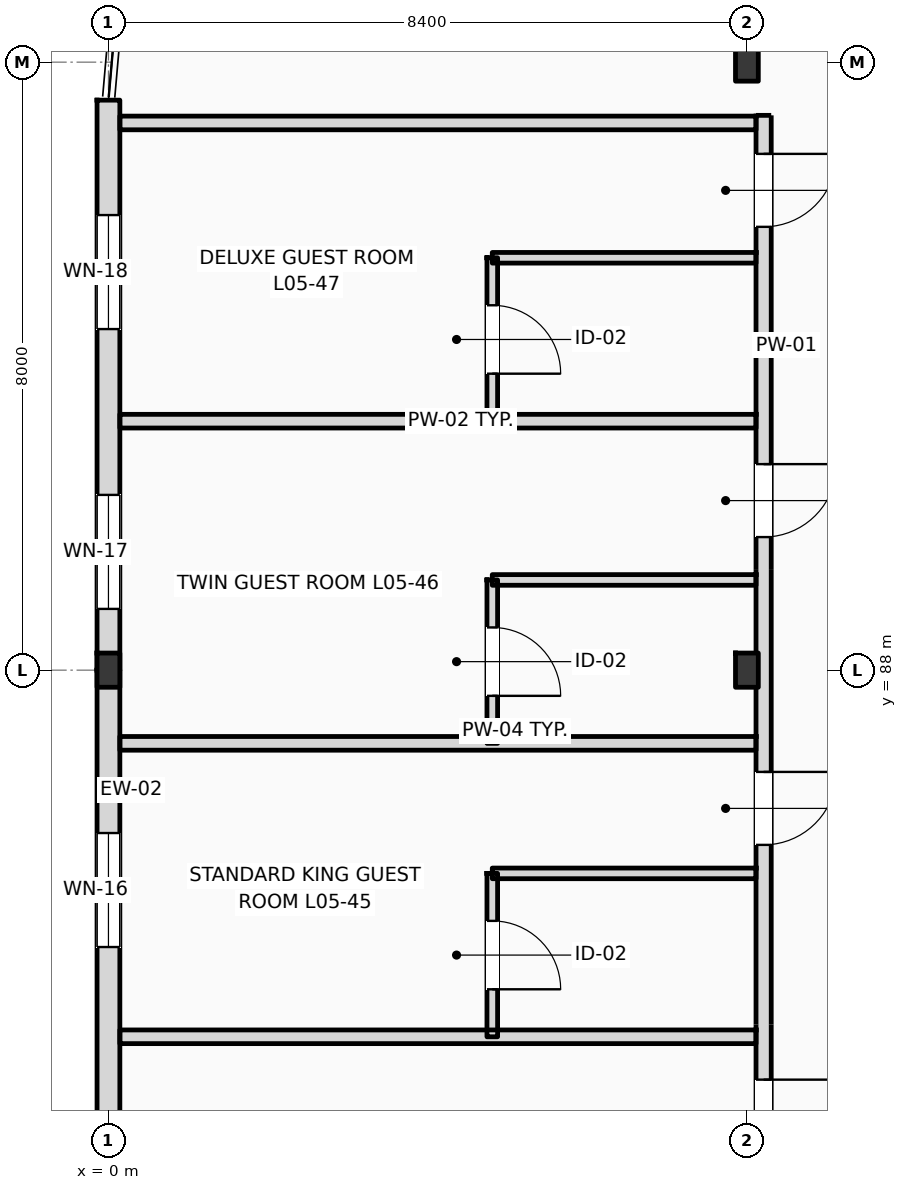
"""IFC4 building model, lengths in metres.
Left out: names, types, materials, properties, quantities, classifications, styles, units other than length and angle.
Written with IfcOpenShell. Run it as: python <this file> out.ifc"""

import sys

from ifc_helpers import new_model, si_unit, direction, frame, frame_2d, origin, origin_2d, place, context, subcontext, project, spatial, rectangle, i_section, extrude, element, fill, save


model = new_model("IFC4")
c1 = context("Model", 3, precision=1e-05, world=origin(), true_north=direction((0.0, 1.0)))
c2 = subcontext(c1, "Body", "Model", "MODEL_VIEW")
j1 = project(units=[si_unit("LENGTHUNIT", "METRE"), si_unit("PLANEANGLEUNIT", "RADIAN")], contexts=[c1])
p1 = place(None, origin())
s1 = spatial("IfcSite", under=j1, at=p1, CompositionType="ELEMENT")
p2 = place(p1, origin())
s2 = spatial("IfcBuilding", under=s1, at=p2, CompositionType="ELEMENT")
p3 = place(p2, frame((0.0, 0.0, 24.6)))
s3 = spatial("IfcBuildingStorey", under=s2, at=p3, CompositionType="ELEMENT", Elevation=24.6)
for number, where, z_axis, x_axis in (
    (1, (0.0, 88.0, 0.0), (0.0, 0.0, 1.0), (1.0, 0.0, 0.0)),
    (2, (8.4, 88.0, 0.0), (0.0, 0.0, 1.0), (1.0, 0.0, 0.0)),
):
    element("IfcColumn", number, at=place(p3, frame(where, z_axis=z_axis, x_axis=x_axis)), inside=s3, PredefinedType="COLUMN", context=c2, shape_type="SweptSolid", body=[
        extrude(i_section(OverallWidth=0.3, OverallDepth=0.45, WebThickness=0.014, FlangeThickness=0.026, FilletRadius=0.027, at=origin_2d()), origin(), (0.0, 0.0, 1.0), 3.6),
    ])
p4 = place(p3, frame((8.4, 96.0, 0.0), z_axis=(0.0, 0.0, 1.0), x_axis=(1.0, 0.0, 0.0)))
e3 = element("IfcColumn", 3, at=p4, inside=s3, PredefinedType="COLUMN", context=c2, shape_type="SweptSolid", body=[
    extrude(i_section(OverallWidth=0.3, OverallDepth=0.5, WebThickness=0.014, FlangeThickness=0.028, FilletRadius=0.027, at=origin_2d()), origin(), (0.0, 0.0, 1.0), 3.6),
])
p5 = place(p3, frame((0.0, 79.5, 0.0), z_axis=(0.0, 0.0, 1.0), x_axis=(0.0, 1.0, 0.0)))
e4 = element("IfcWall", 4, at=p5, inside=s3, PredefinedType="STANDARD", context=c2, shape_type="SweptSolid", body=[
    extrude(rectangle(XDim=8.5, YDim=0.3, at=frame_2d((4.25, 0.0))), origin(), (0.0, 0.0, 1.0), 2.93),
])
p6 = place(p5, frame((0.806, 0.0, 0.9)))
e5 = element("IfcOpeningElement", 5, at=p6, cuts=e4, PredefinedType="OPENING", context=c2, shape_type="SweptSolid", body=[
    extrude(rectangle(XDim=1.5, YDim=1.85, at=frame_2d((0.75, 0.925))), frame((0.0, 0.16, 0.0), z_axis=(0.0, -1.0, 0.0), x_axis=(1.0, 0.0, 0.0)), (0.0, 0.0, 1.0), 0.32),
])
p7 = place(p5, frame((4.857, 0.0, 0.9)))
e6 = element("IfcOpeningElement", 6, at=p7, cuts=e4, PredefinedType="OPENING", context=c2, shape_type="SweptSolid", body=[
    extrude(rectangle(XDim=1.5, YDim=1.85, at=frame_2d((0.75, 0.925))), frame((0.0, 0.16, 0.0), z_axis=(0.0, -1.0, 0.0), x_axis=(1.0, 0.0, 0.0)), (0.0, 0.0, 1.0), 0.32),
])
p8 = place(p3, frame((0.0, 88.0, 0.0), z_axis=(0.0, 0.0, 1.0), x_axis=(0.0, 1.0, 0.0)))
e7 = element("IfcWall", 7, at=p8, inside=s3, PredefinedType="STANDARD", context=c2, shape_type="SweptSolid", body=[
    extrude(rectangle(XDim=7.5, YDim=0.3, at=frame_2d((3.75, 0.0))), origin(), (0.0, 0.0, 1.0), 3.34),
])
p9 = place(p8, frame((0.806, 0.0, 0.9)))
e8 = element("IfcOpeningElement", 8, at=p9, cuts=e7, PredefinedType="OPENING", context=c2, shape_type="SweptSolid", body=[
    extrude(rectangle(XDim=1.5, YDim=2.26, at=frame_2d((0.75, 1.13))), frame((0.0, 0.16, 0.0), z_axis=(0.0, -1.0, 0.0), x_axis=(1.0, 0.0, 0.0)), (0.0, 0.0, 1.0), 0.32),
])
p10 = place(p8, frame((4.488, 0.0, 0.9)))
e9 = element("IfcOpeningElement", 9, at=p10, cuts=e7, PredefinedType="OPENING", context=c2, shape_type="SweptSolid", body=[
    extrude(rectangle(XDim=1.5, YDim=2.26, at=frame_2d((0.75, 1.13))), frame((0.0, 0.16, 0.0), z_axis=(0.0, -1.0, 0.0), x_axis=(1.0, 0.0, 0.0)), (0.0, 0.0, 1.0), 0.32),
])
p11 = place(p3, frame((8.62, 62.64, 0.0), z_axis=(0.0, 0.0, 1.0), x_axis=(0.0, 1.0, 0.0)))
e10 = element("IfcWall", 10, at=p11, inside=s3, PredefinedType="PARTITIONING", context=c2, shape_type="SweptSolid", body=[
    extrude(rectangle(XDim=32.66, YDim=0.2, at=frame_2d((16.33, 0.0))), origin(), (0.0, 0.0, 1.0), 2.93),
])
p12 = place(p11, frame((2.843, 0.0, 0.0)))
e11 = element("IfcOpeningElement", 11, at=p12, cuts=e10, PredefinedType="OPENING", context=c2, shape_type="SweptSolid", body=[
    extrude(rectangle(XDim=0.96, YDim=2.2, at=frame_2d((0.48, 1.1))), frame((0.0, 0.11, 0.0), z_axis=(0.0, -1.0, 0.0), x_axis=(1.0, 0.0, 0.0)), (0.0, 0.0, 1.0), 0.22),
])
p13 = place(p11, frame((4.711, 0.0, 0.0)))
e12 = element("IfcOpeningElement", 12, at=p13, cuts=e10, PredefinedType="OPENING", context=c2, shape_type="SweptSolid", body=[
    extrude(rectangle(XDim=0.96, YDim=2.2, at=frame_2d((0.48, 1.1))), frame((0.0, 0.11, 0.0), z_axis=(0.0, -1.0, 0.0), x_axis=(1.0, 0.0, 0.0)), (0.0, 0.0, 1.0), 0.22),
])
p14 = place(p11, frame((10.911, 0.0, 0.0)))
e13 = element("IfcOpeningElement", 13, at=p14, cuts=e10, PredefinedType="OPENING", context=c2, shape_type="SweptSolid", body=[
    extrude(rectangle(XDim=0.96, YDim=2.2, at=frame_2d((0.48, 1.1))), frame((0.0, 0.11, 0.0), z_axis=(0.0, -1.0, 0.0), x_axis=(1.0, 0.0, 0.0)), (0.0, 0.0, 1.0), 0.22),
])
p15 = place(p11, frame((14.961, 0.0, 0.0)))
e14 = element("IfcOpeningElement", 14, at=p15, cuts=e10, PredefinedType="OPENING", context=c2, shape_type="SweptSolid", body=[
    extrude(rectangle(XDim=0.96, YDim=2.2, at=frame_2d((0.48, 1.1))), frame((0.0, 0.11, 0.0), z_axis=(0.0, -1.0, 0.0), x_axis=(1.0, 0.0, 0.0)), (0.0, 0.0, 1.0), 0.22),
])
p16 = place(p11, frame((19.012, 0.0, 0.0)))
e15 = element("IfcOpeningElement", 15, at=p16, cuts=e10, PredefinedType="OPENING", context=c2, shape_type="SweptSolid", body=[
    extrude(rectangle(XDim=0.96, YDim=2.2, at=frame_2d((0.48, 1.1))), frame((0.0, 0.11, 0.0), z_axis=(0.0, -1.0, 0.0), x_axis=(1.0, 0.0, 0.0)), (0.0, 0.0, 1.0), 0.22),
])
p17 = place(p11, frame((23.061, 0.0, 0.0)))
e16 = element("IfcOpeningElement", 16, at=p17, cuts=e10, PredefinedType="OPENING", context=c2, shape_type="SweptSolid", body=[
    extrude(rectangle(XDim=0.96, YDim=2.2, at=frame_2d((0.48, 1.1))), frame((0.0, 0.11, 0.0), z_axis=(0.0, -1.0, 0.0), x_axis=(1.0, 0.0, 0.0)), (0.0, 0.0, 1.0), 0.22),
])
p18 = place(p11, frame((27.111, 0.0, 0.0)))
e17 = element("IfcOpeningElement", 17, at=p18, cuts=e10, PredefinedType="OPENING", context=c2, shape_type="SweptSolid", body=[
    extrude(rectangle(XDim=0.96, YDim=2.2, at=frame_2d((0.48, 1.1))), frame((0.0, 0.11, 0.0), z_axis=(0.0, -1.0, 0.0), x_axis=(1.0, 0.0, 0.0)), (0.0, 0.0, 1.0), 0.22),
])
p19 = place(p11, frame((31.193, 0.0, 0.0)))
e18 = element("IfcOpeningElement", 18, at=p19, cuts=e10, PredefinedType="OPENING", context=c2, shape_type="SweptSolid", body=[
    extrude(rectangle(XDim=0.96, YDim=2.2, at=frame_2d((0.48, 1.1))), frame((0.0, 0.11, 0.0), z_axis=(0.0, -1.0, 0.0), x_axis=(1.0, 0.0, 0.0)), (0.0, 0.0, 1.0), 0.22),
])
for number, where, z_axis, x_axis in (
    (19, (0.15, 83.176, 0.0), (0.0, 0.0, 1.0), (1.0, 0.0, 0.0)),
    (20, (0.15, 87.037, 0.0), (0.0, 0.0, 1.0), (1.0, 0.0, 0.0)),
):
    element("IfcWall", number, at=place(p3, frame(where, z_axis=z_axis, x_axis=x_axis)), inside=s3, PredefinedType="PARTITIONING", context=c2, shape_type="SweptSolid", body=[
        extrude(rectangle(XDim=8.37, YDim=0.18, at=frame_2d((4.185, 0.0))), origin(), (0.0, 0.0, 1.0), 3.34),
    ])
p20 = place(p3, frame((5.05, 85.326, 0.0), z_axis=(0.0, 0.0, 1.0), x_axis=(1.0, 0.0, 0.0)))
e21 = element("IfcWall", 21, at=p20, inside=s3, PredefinedType="PARTITIONING", context=c2, shape_type="SweptSolid", body=[
    extrude(rectangle(XDim=3.47, YDim=0.14, at=frame_2d((1.735, 0.0))), origin(), (0.0, 0.0, 1.0), 3.34),
])
p21 = place(p3, frame((5.05, 83.176, 0.0), z_axis=(0.0, 0.0, 1.0), x_axis=(0.0, 1.0, 0.0)))
e22 = element("IfcWall", 22, at=p21, inside=s3, PredefinedType="PARTITIONING", context=c2, shape_type="SweptSolid", body=[
    extrude(rectangle(XDim=2.15, YDim=0.14, at=frame_2d((1.075, 0.0))), origin(), (0.0, 0.0, 1.0), 3.34),
])
p22 = place(p21, frame((0.625, 0.0, 0.0)))
e23 = element("IfcOpeningElement", 23, at=p22, cuts=e22, PredefinedType="OPENING", context=c2, shape_type="SweptSolid", body=[
    extrude(rectangle(XDim=0.9, YDim=2.1, at=frame_2d((0.45, 1.05))), frame((0.0, 0.08, 0.0), z_axis=(0.0, -1.0, 0.0), x_axis=(1.0, 0.0, 0.0)), (0.0, 0.0, 1.0), 0.16),
])
p23 = place(p3, frame((0.15, 91.276, 0.0), z_axis=(0.0, 0.0, 1.0), x_axis=(1.0, 0.0, 0.0)))
e24 = element("IfcWall", 24, at=p23, inside=s3, PredefinedType="PARTITIONING", context=c2, shape_type="SweptSolid", body=[
    extrude(rectangle(XDim=8.37, YDim=0.18, at=frame_2d((4.185, 0.0))), origin(), (0.0, 0.0, 1.0), 3.34),
])
p24 = place(p3, frame((5.05, 89.187, 0.0), z_axis=(0.0, 0.0, 1.0), x_axis=(1.0, 0.0, 0.0)))
e25 = element("IfcWall", 25, at=p24, inside=s3, PredefinedType="PARTITIONING", context=c2, shape_type="SweptSolid", body=[
    extrude(rectangle(XDim=3.47, YDim=0.14, at=frame_2d((1.735, 0.0))), origin(), (0.0, 0.0, 1.0), 3.34),
])
p25 = place(p3, frame((5.05, 87.037, 0.0), z_axis=(0.0, 0.0, 1.0), x_axis=(0.0, 1.0, 0.0)))
e26 = element("IfcWall", 26, at=p25, inside=s3, PredefinedType="PARTITIONING", context=c2, shape_type="SweptSolid", body=[
    extrude(rectangle(XDim=2.15, YDim=0.14, at=frame_2d((1.075, 0.0))), origin(), (0.0, 0.0, 1.0), 3.34),
])
p26 = place(p25, frame((0.625, 0.0, 0.0)))
e27 = element("IfcOpeningElement", 27, at=p26, cuts=e26, PredefinedType="OPENING", context=c2, shape_type="SweptSolid", body=[
    extrude(rectangle(XDim=0.9, YDim=2.1, at=frame_2d((0.45, 1.05))), frame((0.0, 0.08, 0.0), z_axis=(0.0, -1.0, 0.0), x_axis=(1.0, 0.0, 0.0)), (0.0, 0.0, 1.0), 0.16),
])
p27 = place(p3, frame((0.15, 95.2, 0.0), z_axis=(0.0, 0.0, 1.0), x_axis=(1.0, 0.0, 0.0)))
e28 = element("IfcWall", 28, at=p27, inside=s3, PredefinedType="PARTITIONING", context=c2, shape_type="SweptSolid", body=[
    extrude(rectangle(XDim=8.37, YDim=0.18, at=frame_2d((4.185, 0.0))), origin(), (0.0, 0.0, 1.0), 3.34),
])
p28 = place(p3, frame((5.05, 93.426, 0.0), z_axis=(0.0, 0.0, 1.0), x_axis=(1.0, 0.0, 0.0)))
e29 = element("IfcWall", 29, at=p28, inside=s3, PredefinedType="PARTITIONING", context=c2, shape_type="SweptSolid", body=[
    extrude(rectangle(XDim=3.47, YDim=0.14, at=frame_2d((1.735, 0.0))), origin(), (0.0, 0.0, 1.0), 3.34),
])
p29 = place(p3, frame((5.05, 91.276, 0.0), z_axis=(0.0, 0.0, 1.0), x_axis=(0.0, 1.0, 0.0)))
e30 = element("IfcWall", 30, at=p29, inside=s3, PredefinedType="PARTITIONING", context=c2, shape_type="SweptSolid", body=[
    extrude(rectangle(XDim=2.15, YDim=0.14, at=frame_2d((1.075, 0.0))), origin(), (0.0, 0.0, 1.0), 3.34),
])
p30 = place(p29, frame((0.625, 0.0, 0.0)))
e31 = element("IfcOpeningElement", 31, at=p30, cuts=e30, PredefinedType="OPENING", context=c2, shape_type="SweptSolid", body=[
    extrude(rectangle(XDim=0.9, YDim=2.1, at=frame_2d((0.45, 1.05))), frame((0.0, 0.08, 0.0), z_axis=(0.0, -1.0, 0.0), x_axis=(1.0, 0.0, 0.0)), (0.0, 0.0, 1.0), 0.16),
])
p31 = place(p7, origin())
e32 = element("IfcWindow", 32, at=p31, inside=s3, PartitioningType="DOUBLE_PANEL_VERTICAL", PredefinedType="WINDOW", context=c2, shape_type="SweptSolid", body=[
    extrude(rectangle(XDim=1.5, YDim=1.85, at=frame_2d((0.75, 0.925))), frame((0.0, 0.03, 0.0), z_axis=(0.0, -1.0, 0.0), x_axis=(1.0, 0.0, 0.0)), (0.0, 0.0, 1.0), 0.06),
])
fill(e6, e32)
p32 = place(p9, origin())
e33 = element("IfcWindow", 33, at=p32, inside=s3, PartitioningType="DOUBLE_PANEL_VERTICAL", PredefinedType="WINDOW", context=c2, shape_type="SweptSolid", body=[
    extrude(rectangle(XDim=1.5, YDim=2.26, at=frame_2d((0.75, 1.13))), frame((0.0, 0.03, 0.0), z_axis=(0.0, -1.0, 0.0), x_axis=(1.0, 0.0, 0.0)), (0.0, 0.0, 1.0), 0.06),
])
fill(e8, e33)
p33 = place(p10, origin())
e34 = element("IfcWindow", 34, at=p33, inside=s3, PartitioningType="DOUBLE_PANEL_VERTICAL", PredefinedType="WINDOW", context=c2, shape_type="SweptSolid", body=[
    extrude(rectangle(XDim=1.5, YDim=2.26, at=frame_2d((0.75, 1.13))), frame((0.0, 0.03, 0.0), z_axis=(0.0, -1.0, 0.0), x_axis=(1.0, 0.0, 0.0)), (0.0, 0.0, 1.0), 0.06),
])
fill(e9, e34)
p34 = place(p16, frame((0.96, 0.0, 0.0), z_axis=(0.0, 0.0, 1.0), x_axis=(-1.0, 0.0, 0.0)))
e35 = element("IfcDoor", 35, at=p34, inside=s3, OperationType="SINGLE_SWING_RIGHT", PredefinedType="DOOR", context=c2, shape_type="SweptSolid", body=[
    extrude(rectangle(XDim=0.96, YDim=2.2, at=frame_2d((0.48, 1.1))), frame((0.0, 0.025, 0.0), z_axis=(0.0, -1.0, 0.0), x_axis=(1.0, 0.0, 0.0)), (0.0, 0.0, 1.0), 0.05),
])
fill(e15, e35)
p35 = place(p17, frame((0.96, 0.0, 0.0), z_axis=(0.0, 0.0, 1.0), x_axis=(-1.0, 0.0, 0.0)))
e36 = element("IfcDoor", 36, at=p35, inside=s3, OperationType="SINGLE_SWING_RIGHT", PredefinedType="DOOR", context=c2, shape_type="SweptSolid", body=[
    extrude(rectangle(XDim=0.96, YDim=2.2, at=frame_2d((0.48, 1.1))), frame((0.0, 0.025, 0.0), z_axis=(0.0, -1.0, 0.0), x_axis=(1.0, 0.0, 0.0)), (0.0, 0.0, 1.0), 0.05),
])
fill(e16, e36)
p36 = place(p22, frame((0.9, 0.0, 0.0), z_axis=(0.0, 0.0, 1.0), x_axis=(-1.0, 0.0, 0.0)))
e37 = element("IfcDoor", 37, at=p36, inside=s3, OperationType="SINGLE_SWING_LEFT", PredefinedType="DOOR", context=c2, shape_type="SweptSolid", body=[
    extrude(rectangle(XDim=0.9, YDim=2.1, at=frame_2d((0.45, 1.05))), frame((0.0, 0.025, 0.0), z_axis=(0.0, -1.0, 0.0), x_axis=(1.0, 0.0, 0.0)), (0.0, 0.0, 1.0), 0.05),
])
fill(e23, e37)
p37 = place(p18, frame((0.96, 0.0, 0.0), z_axis=(0.0, 0.0, 1.0), x_axis=(-1.0, 0.0, 0.0)))
e38 = element("IfcDoor", 38, at=p37, inside=s3, OperationType="SINGLE_SWING_RIGHT", PredefinedType="DOOR", context=c2, shape_type="SweptSolid", body=[
    extrude(rectangle(XDim=0.96, YDim=2.2, at=frame_2d((0.48, 1.1))), frame((0.0, 0.025, 0.0), z_axis=(0.0, -1.0, 0.0), x_axis=(1.0, 0.0, 0.0)), (0.0, 0.0, 1.0), 0.05),
])
fill(e17, e38)
p38 = place(p26, frame((0.9, 0.0, 0.0), z_axis=(0.0, 0.0, 1.0), x_axis=(-1.0, 0.0, 0.0)))
e39 = element("IfcDoor", 39, at=p38, inside=s3, OperationType="SINGLE_SWING_LEFT", PredefinedType="DOOR", context=c2, shape_type="SweptSolid", body=[
    extrude(rectangle(XDim=0.9, YDim=2.1, at=frame_2d((0.45, 1.05))), frame((0.0, 0.025, 0.0), z_axis=(0.0, -1.0, 0.0), x_axis=(1.0, 0.0, 0.0)), (0.0, 0.0, 1.0), 0.05),
])
fill(e27, e39)
p39 = place(p19, frame((0.96, 0.0, 0.0), z_axis=(0.0, 0.0, 1.0), x_axis=(-1.0, 0.0, 0.0)))
e40 = element("IfcDoor", 40, at=p39, inside=s3, OperationType="SINGLE_SWING_RIGHT", PredefinedType="DOOR", context=c2, shape_type="SweptSolid", body=[
    extrude(rectangle(XDim=0.96, YDim=2.2, at=frame_2d((0.48, 1.1))), frame((0.0, 0.025, 0.0), z_axis=(0.0, -1.0, 0.0), x_axis=(1.0, 0.0, 0.0)), (0.0, 0.0, 1.0), 0.05),
])
fill(e18, e40)
p40 = place(p30, frame((0.9, 0.0, 0.0), z_axis=(0.0, 0.0, 1.0), x_axis=(-1.0, 0.0, 0.0)))
e41 = element("IfcDoor", 41, at=p40, inside=s3, OperationType="SINGLE_SWING_LEFT", PredefinedType="DOOR", context=c2, shape_type="SweptSolid", body=[
    extrude(rectangle(XDim=0.9, YDim=2.1, at=frame_2d((0.45, 1.05))), frame((0.0, 0.025, 0.0), z_axis=(0.0, -1.0, 0.0), x_axis=(1.0, 0.0, 0.0)), (0.0, 0.0, 1.0), 0.05),
])
fill(e31, e41)
save(model, sys.argv[1])
